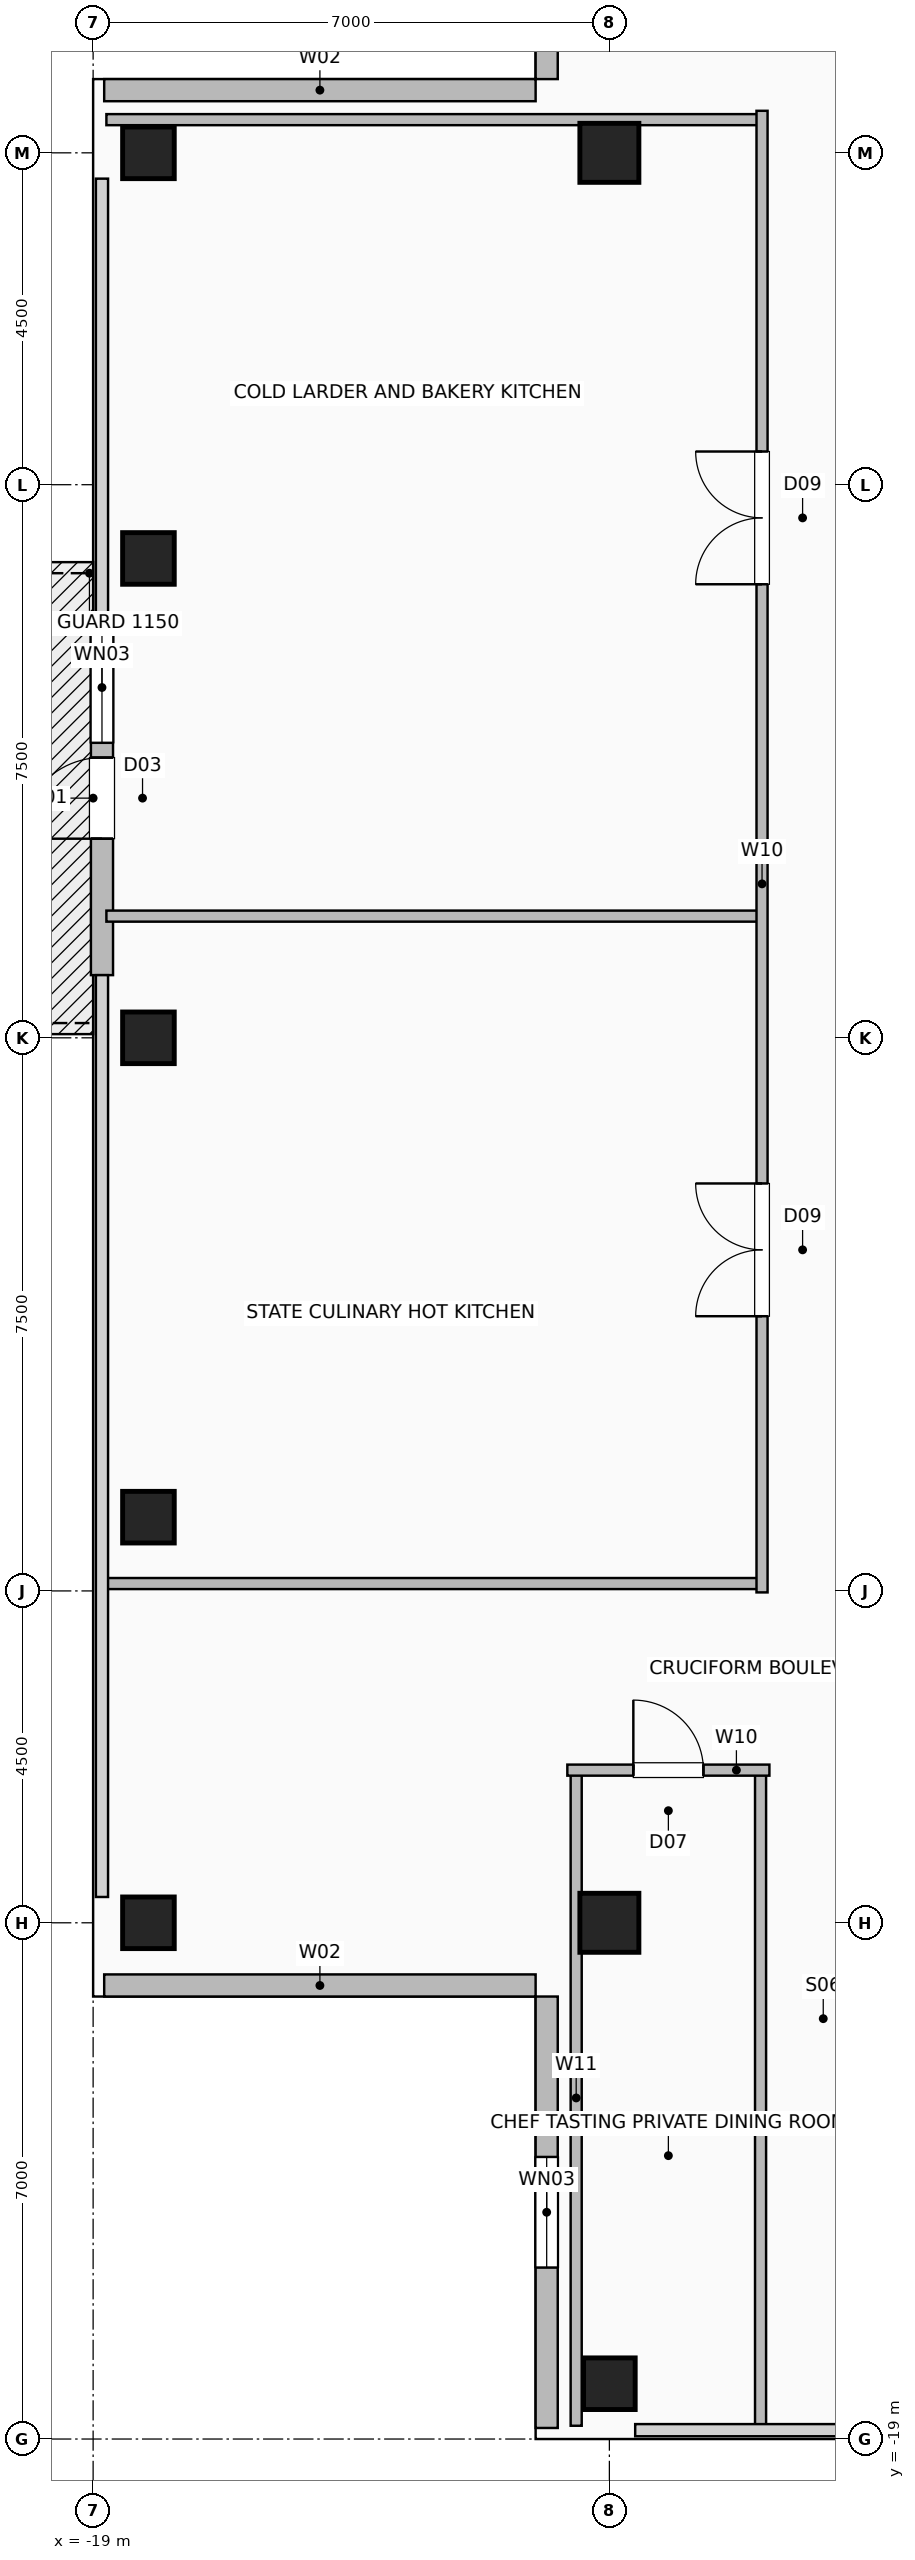
"""IFC4 building model, lengths in metres.
Left out: names, types, materials, properties, quantities, classifications, styles, units other than length and angle.
Written with IfcOpenShell. Run it as: python <this file> out.ifc"""

import sys

from ifc_helpers import new_model, si_unit, direction, frame, frame_2d, origin, origin_2d, place, context, subcontext, project, spatial, rectangle, hollow_rectangle, extrude, element, fill, save


model = new_model("IFC4")
c1 = context("Model", 3, precision=1e-05, world=origin(), true_north=direction((0.0, 1.0)))
c2 = subcontext(c1, "Body", "Model", "MODEL_VIEW")
j1 = project(units=[si_unit("LENGTHUNIT", "METRE"), si_unit("PLANEANGLEUNIT", "RADIAN")], contexts=[c1])
p1 = place(None, origin())
s1 = spatial("IfcSite", under=j1, at=p1, CompositionType="ELEMENT")
p2 = place(p1, origin())
s2 = spatial("IfcBuilding", under=s1, at=p2, CompositionType="ELEMENT")
p3 = place(p2, frame((0.0, 0.0, 254.0)))
s3 = spatial("IfcBuildingStorey", under=s2, at=p3, CompositionType="ELEMENT", Elevation=254.0)
for number, where, z_axis, x_axis in (
    (1, (-12.0, -18.25, 0.0), (0.0, 0.0, 1.0), (1.0, 0.0, 0.0)),
    (2, (-18.25, -12.0, 0.0), (0.0, 0.0, 1.0), (1.0, 0.0, 0.0)),
    (3, (-18.25, -6.5, 0.0), (0.0, 0.0, 1.0), (1.0, 0.0, 0.0)),
    (4, (-18.25, 0.0, 0.0), (0.0, 0.0, 1.0), (1.0, 0.0, 0.0)),
    (5, (-18.25, 6.5, 0.0), (0.0, 0.0, 1.0), (1.0, 0.0, 0.0)),
    (6, (-18.25, 12.0, 0.0), (0.0, 0.0, 1.0), (1.0, 0.0, 0.0)),
):
    element("IfcColumn", number, at=place(p3, frame(where, z_axis=z_axis, x_axis=x_axis)), inside=s3, PredefinedType="COLUMN", context=c2, shape_type="SweptSolid", body=[
        extrude(hollow_rectangle(XDim=0.7, YDim=0.7, WallThickness=0.035, at=origin_2d()), origin(), (0.0, 0.0, 1.0), 3.6),
    ])
for number, where, z_axis, x_axis in (
    (7, (-12.0, -12.0, 0.0), (0.0, 0.0, 1.0), (1.0, 0.0, 0.0)),
    (8, (-12.0, 12.0, 0.0), (0.0, 0.0, 1.0), (1.0, 0.0, 0.0)),
):
    element("IfcColumn", number, at=place(p3, frame(where, z_axis=z_axis, x_axis=x_axis)), inside=s3, PredefinedType="COLUMN", context=c2, shape_type="SweptSolid", body=[
        extrude(hollow_rectangle(XDim=0.8, YDim=0.8, WallThickness=0.04, at=origin_2d()), origin(), (0.0, 0.0, 1.0), 3.6),
    ])
p4 = place(p3, frame((-18.88, 0.85, 0.0), z_axis=(0.0, 0.0, 1.0), x_axis=(0.0, 1.0, 0.0)))
e9 = element("IfcWall", 9, at=p4, inside=s3, PredefinedType="SOLIDWALL", context=c2, shape_type="SweptSolid", body=[
    extrude(rectangle(XDim=4.8, YDim=0.3, at=frame_2d((2.4, 0.0))), origin(), (0.0, 0.0, 1.0), 3.36),
])
p5 = place(p4, frame((1.85, 0.0, 0.0)))
e10 = element("IfcOpeningElement", 10, at=p5, cuts=e9, PredefinedType="OPENING", context=c2, shape_type="SweptSolid", body=[
    extrude(rectangle(XDim=1.1, YDim=2.2, at=frame_2d((0.55, 1.1))), frame((0.0, 0.16, 0.0), z_axis=(0.0, -1.0, 0.0), x_axis=(1.0, 0.0, 0.0)), (0.0, 0.0, 1.0), 0.32),
])
p6 = place(p4, frame((3.15, 0.0, 0.85)))
e11 = element("IfcOpeningElement", 11, at=p6, cuts=e9, PredefinedType="OPENING", context=c2, shape_type="SweptSolid", body=[
    extrude(rectangle(XDim=1.5, YDim=1.8, at=frame_2d((0.75, 0.9))), frame((0.0, 0.16, 0.0), z_axis=(0.0, -1.0, 0.0), x_axis=(1.0, 0.0, 0.0)), (0.0, 0.0, 1.0), 0.32),
])
p7 = place(p3, frame((-12.85, -18.85, 0.0), z_axis=(0.0, 0.0, 1.0), x_axis=(0.0, 1.0, 0.0)))
e12 = element("IfcWall", 12, at=p7, inside=s3, PredefinedType="SOLIDWALL", context=c2, shape_type="SweptSolid", body=[
    extrude(rectangle(XDim=5.85, YDim=0.3, at=frame_2d((2.925, 0.0))), origin(), (0.0, 0.0, 1.0), 3.36),
])
p8 = place(p7, frame((2.175, 0.0, 0.9)))
e13 = element("IfcOpeningElement", 13, at=p8, cuts=e12, PredefinedType="OPENING", context=c2, shape_type="SweptSolid", body=[
    extrude(rectangle(XDim=1.5, YDim=1.8, at=frame_2d((0.75, 0.9))), frame((0.0, 0.16, 0.0), z_axis=(0.0, -1.0, 0.0), x_axis=(1.0, 0.0, 0.0)), (0.0, 0.0, 1.0), 0.32),
])
p9 = place(p3, frame((-18.85, -12.85, 0.0), z_axis=(0.0, 0.0, 1.0), x_axis=(1.0, 0.0, 0.0)))
e14 = element("IfcWall", 14, at=p9, inside=s3, PredefinedType="SOLIDWALL", context=c2, shape_type="SweptSolid", body=[
    extrude(rectangle(XDim=5.85, YDim=0.3, at=frame_2d((2.925, 0.0))), origin(), (0.0, 0.0, 1.0), 3.36),
])
p10 = place(p3, frame((-12.85, 18.85, 0.0), z_axis=(0.0, 0.0, 1.0), x_axis=(0.0, -1.0, 0.0)))
e15 = element("IfcWall", 15, at=p10, inside=s3, PredefinedType="SOLIDWALL", context=c2, shape_type="SweptSolid", body=[
    extrude(rectangle(XDim=5.85, YDim=0.3, at=frame_2d((2.925, 0.0))), origin(), (0.0, 0.0, 1.0), 3.36),
])
p11 = place(p10, frame((2.175, 0.0, 0.9)))
e16 = element("IfcOpeningElement", 16, at=p11, cuts=e15, PredefinedType="OPENING", context=c2, shape_type="SweptSolid", body=[
    extrude(rectangle(XDim=1.5, YDim=1.8, at=frame_2d((0.75, 0.9))), frame((0.0, 0.16, 0.0), z_axis=(0.0, -1.0, 0.0), x_axis=(1.0, 0.0, 0.0)), (0.0, 0.0, 1.0), 0.32),
])
p12 = place(p3, frame((-18.85, 12.85, 0.0), z_axis=(0.0, 0.0, 1.0), x_axis=(1.0, 0.0, 0.0)))
e17 = element("IfcWall", 17, at=p12, inside=s3, PredefinedType="SOLIDWALL", context=c2, shape_type="SweptSolid", body=[
    extrude(rectangle(XDim=5.85, YDim=0.3, at=frame_2d((2.925, 0.0))), origin(), (0.0, 0.0, 1.0), 3.36),
])
for number, where, z_axis, x_axis in (
    (18, (-12.45, -18.82, 0.0), (0.0, 0.0, 1.0), (0.0, 1.0, 0.0)),
    (19, (-9.95, -18.82, 0.0), (0.0, 0.0, 1.0), (0.0, 1.0, 0.0)),
):
    element("IfcWall", number, at=place(p3, frame(where, z_axis=z_axis, x_axis=x_axis)), inside=s3, PredefinedType="PARTITIONING", context=c2, shape_type="SweptSolid", body=[
        extrude(rectangle(XDim=8.89, YDim=0.15, at=frame_2d((4.445, 0.0))), origin(), (0.0, 0.0, 1.0), 3.36),
    ])
p13 = place(p3, frame((-12.57, -9.93, 0.0), z_axis=(0.0, 0.0, 1.0), x_axis=(1.0, 0.0, 0.0)))
e20 = element("IfcWall", 20, at=p13, inside=s3, PredefinedType="PARTITIONING", context=c2, shape_type="SweptSolid", body=[
    extrude(rectangle(XDim=2.74, YDim=0.15, at=frame_2d((1.37, 0.0))), origin(), (0.0, 0.0, 1.0), 3.36),
])
p14 = place(p13, frame((0.895, 0.0, 0.0)))
e21 = element("IfcOpeningElement", 21, at=p14, cuts=e20, PredefinedType="OPENING", context=c2, shape_type="SweptSolid", body=[
    extrude(rectangle(XDim=0.95, YDim=2.06, at=frame_2d((0.475, 1.03))), frame((0.0, 0.085, 0.0), z_axis=(0.0, -1.0, 0.0), x_axis=(1.0, 0.0, 0.0)), (0.0, 0.0, 1.0), 0.17),
])
for number, where, z_axis, x_axis in (
    (22, (-18.82, -7.4, 0.0), (0.0, 0.0, 1.0), (1.0, 0.0, 0.0)),
    (23, (-18.82, 1.65, 0.0), (0.0, 0.0, 1.0), (1.0, 0.0, 0.0)),
    (24, (-18.82, 12.45, 0.0), (0.0, 0.0, 1.0), (1.0, 0.0, 0.0)),
):
    element("IfcWall", number, at=place(p3, frame(where, z_axis=z_axis, x_axis=x_axis)), inside=s3, PredefinedType="PARTITIONING", context=c2, shape_type="SweptSolid", body=[
        extrude(rectangle(XDim=8.89, YDim=0.15, at=frame_2d((4.445, 0.0))), origin(), (0.0, 0.0, 1.0), 3.36),
    ])
p15 = place(p3, frame((-9.93, -7.52, 0.0), z_axis=(0.0, 0.0, 1.0), x_axis=(0.0, 1.0, 0.0)))
e25 = element("IfcWall", 25, at=p15, inside=s3, PredefinedType="PARTITIONING", context=c2, shape_type="SweptSolid", body=[
    extrude(rectangle(XDim=20.09, YDim=0.15, at=frame_2d((10.045, 0.0))), origin(), (0.0, 0.0, 1.0), 3.36),
])
p16 = place(p15, frame((3.745, 0.0, 0.0)))
e26 = element("IfcOpeningElement", 26, at=p16, cuts=e25, PredefinedType="OPENING", context=c2, shape_type="SweptSolid", body=[
    extrude(rectangle(XDim=1.8, YDim=2.08, at=frame_2d((0.9, 1.04))), frame((0.0, 0.085, 0.0), z_axis=(0.0, -1.0, 0.0), x_axis=(1.0, 0.0, 0.0)), (0.0, 0.0, 1.0), 0.17),
])
p17 = place(p15, frame((13.67, 0.0, 0.0)))
e27 = element("IfcOpeningElement", 27, at=p17, cuts=e25, PredefinedType="OPENING", context=c2, shape_type="SweptSolid", body=[
    extrude(rectangle(XDim=1.8, YDim=2.08, at=frame_2d((0.9, 1.04))), frame((0.0, 0.085, 0.0), z_axis=(0.0, -1.0, 0.0), x_axis=(1.0, 0.0, 0.0)), (0.0, 0.0, 1.0), 0.17),
])
p18 = place(p5, origin())
e28 = element("IfcDoor", 28, at=p18, inside=s3, OperationType="SINGLE_SWING_LEFT", PredefinedType="DOOR", context=c2, shape_type="SweptSolid", body=[
    extrude(rectangle(XDim=1.1, YDim=2.2, at=frame_2d((0.55, 1.1))), frame((0.0, 0.025, 0.0), z_axis=(0.0, -1.0, 0.0), x_axis=(1.0, 0.0, 0.0)), (0.0, 0.0, 1.0), 0.05),
])
fill(e10, e28)
p19 = place(p6, origin())
e29 = element("IfcWindow", 29, at=p19, inside=s3, PartitioningType="SINGLE_PANEL", PredefinedType="WINDOW", context=c2, shape_type="SweptSolid", body=[
    extrude(rectangle(XDim=1.5, YDim=1.8, at=frame_2d((0.75, 0.9))), frame((0.0, 0.03, 0.0), z_axis=(0.0, -1.0, 0.0), x_axis=(1.0, 0.0, 0.0)), (0.0, 0.0, 1.0), 0.06),
])
fill(e11, e29)
p20 = place(p8, origin())
e30 = element("IfcWindow", 30, at=p20, inside=s3, PartitioningType="SINGLE_PANEL", PredefinedType="WINDOW", context=c2, shape_type="SweptSolid", body=[
    extrude(rectangle(XDim=1.5, YDim=1.8, at=frame_2d((0.75, 0.9))), frame((0.0, 0.03, 0.0), z_axis=(0.0, -1.0, 0.0), x_axis=(1.0, 0.0, 0.0)), (0.0, 0.0, 1.0), 0.06),
])
fill(e13, e30)
p21 = place(p14, origin())
e31 = element("IfcDoor", 31, at=p21, inside=s3, OperationType="SINGLE_SWING_LEFT", PredefinedType="DOOR", context=c2, shape_type="SweptSolid", body=[
    extrude(rectangle(XDim=0.95, YDim=2.06, at=frame_2d((0.475, 1.03))), frame((0.0, 0.025, 0.0), z_axis=(0.0, -1.0, 0.0), x_axis=(1.0, 0.0, 0.0)), (0.0, 0.0, 1.0), 0.05),
])
fill(e21, e31)
p22 = place(p16, origin())
e32 = element("IfcDoor", 32, at=p22, inside=s3, OperationType="DOUBLE_DOOR_SINGLE_SWING", PredefinedType="DOOR", context=c2, shape_type="SweptSolid", body=[
    extrude(rectangle(XDim=1.8, YDim=2.08, at=frame_2d((0.9, 1.04))), frame((0.0, 0.025, 0.0), z_axis=(0.0, -1.0, 0.0), x_axis=(1.0, 0.0, 0.0)), (0.0, 0.0, 1.0), 0.05),
])
fill(e26, e32)
p23 = place(p17, origin())
e33 = element("IfcDoor", 33, at=p23, inside=s3, OperationType="DOUBLE_DOOR_SINGLE_SWING", PredefinedType="DOOR", context=c2, shape_type="SweptSolid", body=[
    extrude(rectangle(XDim=1.8, YDim=2.08, at=frame_2d((0.9, 1.04))), frame((0.0, 0.025, 0.0), z_axis=(0.0, -1.0, 0.0), x_axis=(1.0, 0.0, 0.0)), (0.0, 0.0, 1.0), 0.05),
])
fill(e27, e33)
save(model, sys.argv[1])
